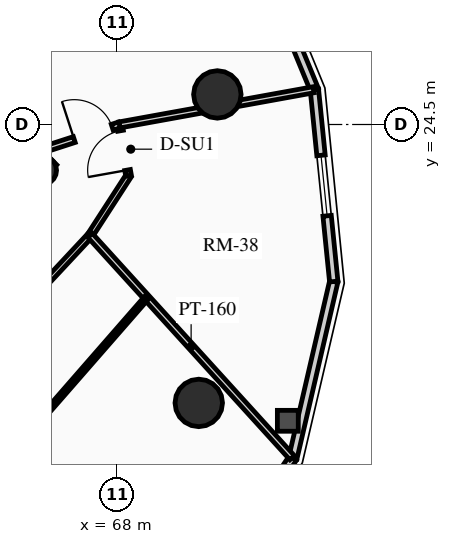
"""IFC4 building model, lengths in metres.
Left out: names, types, materials, properties, quantities, classifications, styles, units other than length and angle.
Written with IfcOpenShell. Run it as: python <this file> out.ifc"""

import sys

from ifc_helpers import new_model, si_unit, direction, frame, frame_2d, origin, origin_2d, place, context, subcontext, project, spatial, rectangle, circle, hollow_circle, extrude, source, transform, mapped, element, fill, save


model = new_model("IFC4")
c1 = context("Model", 3, precision=1e-05, world=origin(), true_north=direction((0.0, 1.0)))
c2 = subcontext(c1, "Body", "Model", "MODEL_VIEW")
j1 = project(units=[si_unit("LENGTHUNIT", "METRE"), si_unit("PLANEANGLEUNIT", "RADIAN")], contexts=[c1])
p1 = place(None, origin())
s1 = spatial("IfcSite", under=j1, at=p1, CompositionType="ELEMENT")
p2 = place(p1, origin())
s2 = spatial("IfcBuilding", under=s1, at=p2, CompositionType="ELEMENT")
p3 = place(p2, frame((0.0, 0.0, 166.15)))
s3 = spatial("IfcBuildingStorey", under=s2, at=p3, CompositionType="ELEMENT", Elevation=166.15)
p4 = place(p3, frame((66.268, 23.298, 0.0), z_axis=(0.0, 0.0, 1.0), x_axis=(-0.707106781187, 0.707106781187, 0.0)))
e1 = element("IfcWall", 1, at=p4, inside=s3, PredefinedType="SHEAR", context=c2, shape_type="SweptSolid", body=[
    extrude(rectangle(XDim=14.1, YDim=0.4, at=frame_2d((7.05, 0.0))), origin(), (0.0, 0.0, 1.0), 2.91),
])
p5 = place(p3, frame((66.024, 23.294, 0.0), z_axis=(0.0, 0.0, 1.0), x_axis=(0.707106781187, 0.707106781187, 0.0)))
e2 = element("IfcColumn", 2, at=p5, inside=s3, PredefinedType="COLUMN", context=c2, shape_type="SweptSolid", body=[
    extrude(hollow_circle(Radius=0.38, WallThickness=0.032, at=origin_2d()), origin(), (0.0, 0.0, 1.0), 2.91),
])
for number, where, z_axis, x_axis in (
    (3, (70.146, 17.173, 0.0), (0.0, 0.0, 1.0), (1.0, 0.0, 0.0)),
    (4, (70.635, 25.291, 0.0), (0.0, 0.0, 1.0), (1.0, 0.0, 0.0)),
):
    element("IfcColumn", number, at=place(p3, frame(where, z_axis=z_axis, x_axis=x_axis)), inside=s3, PredefinedType="USERDEFINED", context=c2, shape_type="SweptSolid", body=[
        extrude(circle(Radius=0.625, at=origin_2d()), origin(), (0.0, 0.0, 1.0), 2.91),
    ])
p6 = place(p3, frame((72.622, 15.721, 0.0), z_axis=(0.0, 0.0, 1.0), x_axis=(-0.559635286042, -0.828739009952, 0.0)))
e5 = element("IfcWall", 5, at=p6, inside=s3, PredefinedType="SOLIDWALL", context=c2, shape_type="SweptSolid", body=[
    extrude(rectangle(XDim=4.569, YDim=0.22, at=frame_2d((2.284, 0.0))), origin(), (0.0, 0.0, 1.0), 2.675),
])
m1 = source(origin(), c2, "Body", "SweptSolid", [
    extrude(rectangle(XDim=1.6, YDim=1.3, at=frame_2d((0.8, 0.65))), frame((0.0, 0.12, 0.0), z_axis=(0.0, -1.0, 0.0), x_axis=(1.0, 0.0, 0.0)), (0.0, 0.0, 1.0), 0.24),
])
p7 = place(p6, frame((1.484, 0.0, 0.65)))
e6 = element("IfcOpeningElement", 6, at=p7, cuts=e5, PredefinedType="OPENING", context=c2, shape_type="MappedRepresentation", body=[
    mapped(m1, transform((0.0, 0.0, 0.0), x_axis=(1.0, 0.0, 0.0), y_axis=(0.0, 1.0, 0.0), z_axis=(0.0, 0.0, 1.0), scale=1.0)),
])
p8 = place(p3, frame((73.698, 20.367, 0.0), z_axis=(0.0, 0.0, 1.0), x_axis=(-0.225659540039, -0.974206226622, 0.0)))
e7 = element("IfcWall", 7, at=p8, inside=s3, PredefinedType="SOLIDWALL", context=c2, shape_type="SweptSolid", body=[
    extrude(rectangle(XDim=4.769, YDim=0.22, at=frame_2d((2.385, 0.0))), origin(), (0.0, 0.0, 1.0), 2.675),
])
p9 = place(p3, frame((73.189, 25.418, 0.0), z_axis=(0.0, 0.0, 1.0), x_axis=(0.100279889424, -0.994959267396, 0.0)))
e8 = element("IfcWall", 8, at=p9, inside=s3, PredefinedType="SOLIDWALL", context=c2, shape_type="SweptSolid", body=[
    extrude(rectangle(XDim=5.076, YDim=0.22, at=frame_2d((2.538, 0.0))), origin(), (0.0, 0.0, 1.0), 2.675),
])
p10 = place(p9, frame((1.738, 0.0, 0.65)))
e9 = element("IfcOpeningElement", 9, at=p10, cuts=e8, PredefinedType="OPENING", context=c2, shape_type="MappedRepresentation", body=[
    mapped(m1, transform((0.0, 0.0, 0.0), x_axis=(1.0, 0.0, 0.0), y_axis=(0.0, 1.0, 0.0), z_axis=(0.0, 0.0, 1.0), scale=1.0)),
])
p11 = place(p3, frame((71.144, 30.378, 0.0), z_axis=(0.0, 0.0, 1.0), x_axis=(0.38111364655, -0.924528197738, 0.0)))
e10 = element("IfcWall", 10, at=p11, inside=s3, PredefinedType="SOLIDWALL", context=c2, shape_type="SweptSolid", body=[
    extrude(rectangle(XDim=5.366, YDim=0.22, at=frame_2d((2.683, 0.0))), origin(), (0.0, 0.0, 1.0), 2.675),
])
p12 = place(p3, frame((62.812, 16.788, 0.0), z_axis=(0.0, 0.0, 1.0), x_axis=(0.682323555485, 0.731050316757, 0.0)))
e11 = element("IfcWall", 11, at=p12, inside=s3, PredefinedType="PARTITIONING", context=c2, shape_type="SweptSolid", body=[
    extrude(rectangle(XDim=6.559, YDim=0.15, at=frame_2d((3.279, 0.0))), origin(), (0.0, 0.0, 1.0), 2.245),
])
p13 = place(p3, frame((67.287, 21.582, 0.0), z_axis=(0.0, 0.0, 1.0), x_axis=(0.543202443884, 0.839601753785, 0.0)))
e12 = element("IfcWall", 12, at=p13, inside=s3, PredefinedType="PARTITIONING", context=c2, shape_type="SweptSolid", body=[
    extrude(rectangle(XDim=1.866, YDim=0.15, at=frame_2d((0.933, 0.0))), origin(), (0.0, 0.0, 1.0), 2.245),
])
p14 = place(p3, frame((68.3, 23.149, 0.0), z_axis=(0.0, 0.0, 1.0), x_axis=(-0.176423554694, 0.984314344785, 0.0)))
e13 = element("IfcWall", 13, at=p14, inside=s3, PredefinedType="PARTITIONING", context=c2, shape_type="SweptSolid", body=[
    extrude(rectangle(XDim=1.362, YDim=0.15, at=frame_2d((0.681, 0.0))), origin(), (0.0, 0.0, 1.0), 2.245),
])
m2 = source(origin(), c2, "Body", "SweptSolid", [
    extrude(rectangle(XDim=1.05, YDim=2.015, at=frame_2d((0.525, 1.007))), frame((0.0, 0.085, 0.0), z_axis=(0.0, -1.0, 0.0), x_axis=(1.0, 0.0, 0.0)), (0.0, 0.0, 1.0), 0.17),
])
p15 = place(p14, frame((0.156, 0.0, 0.0)))
e14 = element("IfcOpeningElement", 14, at=p15, cuts=e13, PredefinedType="OPENING", context=c2, shape_type="MappedRepresentation", body=[
    mapped(m2, transform((0.0, 0.0, 0.0), x_axis=(1.0, 0.0, 0.0), y_axis=(0.0, 1.0, 0.0), z_axis=(0.0, 0.0, 1.0), scale=1.0)),
])
p16 = place(p3, frame((67.287, 21.582, 0.0), z_axis=(0.0, 0.0, 1.0), x_axis=(0.672520632772, -0.740078373212, 0.0)))
e15 = element("IfcWall", 15, at=p16, inside=s3, PredefinedType="PARTITIONING", context=c2, shape_type="SweptSolid", body=[
    extrude(rectangle(XDim=7.907, YDim=0.16, at=frame_2d((3.954, 0.0))), origin(), (0.0, 0.0, 1.0), 2.245),
])
p17 = place(p3, frame((68.06, 24.489, 0.0), z_axis=(0.0, 0.0, 1.0), x_axis=(0.983987798657, 0.178235832802, 0.0)))
e16 = element("IfcWall", 16, at=p17, inside=s3, PredefinedType="PARTITIONING", context=c2, shape_type="SweptSolid", body=[
    extrude(rectangle(XDim=5.193, YDim=0.16, at=frame_2d((2.596, 0.0))), origin(), (0.0, 0.0, 1.0), 2.245),
])
p18 = place(p3, frame((66.021, 23.828, 0.0), z_axis=(0.0, 0.0, 1.0), x_axis=(0.951292345965, 0.308290240695, 0.0)))
e17 = element("IfcWall", 17, at=p18, inside=s3, PredefinedType="PARTITIONING", context=c2, shape_type="SweptSolid", body=[
    extrude(rectangle(XDim=2.144, YDim=0.16, at=frame_2d((1.072, 0.0))), origin(), (0.0, 0.0, 1.0), 2.245),
])
m3 = source(origin(), c2, "Body", "SweptSolid", [
    extrude(rectangle(XDim=1.05, YDim=2.015, at=frame_2d((0.525, 1.007))), frame((0.0, 0.09, 0.0), z_axis=(0.0, -1.0, 0.0), x_axis=(1.0, 0.0, 0.0)), (0.0, 0.0, 1.0), 0.18),
])
p19 = place(p18, frame((0.894, 0.0, 0.0)))
e18 = element("IfcOpeningElement", 18, at=p19, cuts=e17, PredefinedType="OPENING", context=c2, shape_type="MappedRepresentation", body=[
    mapped(m3, transform((0.0, 0.0, 0.0), x_axis=(1.0, 0.0, 0.0), y_axis=(0.0, 1.0, 0.0), z_axis=(0.0, 0.0, 1.0), scale=1.0)),
])
p20 = place(p3, frame((64.839, 15.433, 0.0), z_axis=(0.0, 0.0, 1.0), x_axis=(0.657505208165, 0.753449999161, 0.0)))
e19 = element("IfcWall", 19, at=p20, inside=s3, PredefinedType="PARTITIONING", context=c2, shape_type="SweptSolid", body=[
    extrude(rectangle(XDim=5.988, YDim=0.125, at=frame_2d((2.994, 0.0))), origin(), (0.0, 0.0, 1.0), 2.245),
])
m4 = source(origin(), c2, "Body", "SweptSolid", [
    extrude(rectangle(XDim=1.6, YDim=1.3, at=frame_2d((0.8, 0.65))), frame((0.0, 0.03, 0.0), z_axis=(0.0, -1.0, 0.0), x_axis=(1.0, 0.0, 0.0)), (0.0, 0.0, 1.0), 0.06),
])
p21 = place(p10, origin())
e20 = element("IfcWindow", 20, at=p21, inside=s3, PartitioningType="SINGLE_PANEL", PredefinedType="WINDOW", context=c2, shape_type="MappedRepresentation", body=[
    mapped(m4, transform((0.0, 0.0, 0.0), x_axis=(1.0, 0.0, 0.0), y_axis=(0.0, 1.0, 0.0), z_axis=(0.0, 0.0, 1.0), scale=1.0)),
])
fill(e9, e20)
m5 = source(origin(), c2, "Body", "SweptSolid", [
    extrude(rectangle(XDim=1.05, YDim=2.015, at=frame_2d((0.525, 1.007))), frame((0.0, 0.025, 0.0), z_axis=(0.0, -1.0, 0.0), x_axis=(1.0, 0.0, 0.0)), (0.0, 0.0, 1.0), 0.05),
])
p22 = place(p19, origin())
e21 = element("IfcDoor", 21, at=p22, inside=s3, OperationType="SINGLE_SWING_LEFT", PredefinedType="DOOR", context=c2, shape_type="MappedRepresentation", body=[
    mapped(m5, transform((0.0, 0.0, 0.0), x_axis=(1.0, 0.0, 0.0), y_axis=(0.0, 1.0, 0.0), z_axis=(0.0, 0.0, 1.0), scale=1.0)),
])
fill(e18, e21)
p23 = place(p15, origin())
e22 = element("IfcDoor", 22, at=p23, inside=s3, OperationType="SINGLE_SWING_LEFT", PredefinedType="DOOR", context=c2, shape_type="MappedRepresentation", body=[
    mapped(m5, transform((0.0, 0.0, 0.0), x_axis=(1.0, 0.0, 0.0), y_axis=(0.0, 1.0, 0.0), z_axis=(0.0, 0.0, 1.0), scale=1.0)),
])
fill(e14, e22)
save(model, sys.argv[1])
